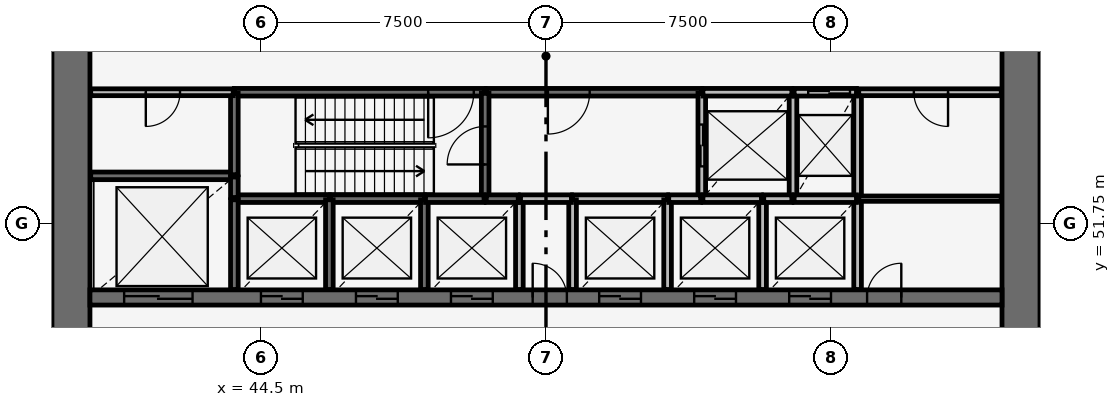
"""IFC4 building model, lengths in metres.
Left out: names, types, materials, properties, quantities, classifications, styles, units other than length and angle.
Written with IfcOpenShell. Run it as: python <this file> out.ifc"""

import sys

from ifc_helpers import new_model, si_unit, direction, frame, frame_2d, origin, place, context, subcontext, project, spatial, rectangle, extrude, source, transform, mapped, element, fill, save


model = new_model("IFC4")
c1 = context("Model", 3, precision=1e-05, world=origin(), true_north=direction((0.0, 1.0)))
c2 = subcontext(c1, "Body", "Model", "MODEL_VIEW")
j1 = project(units=[si_unit("LENGTHUNIT", "METRE"), si_unit("PLANEANGLEUNIT", "RADIAN")], contexts=[c1])
p1 = place(None, origin())
s1 = spatial("IfcSite", under=j1, at=p1, CompositionType="ELEMENT")
p2 = place(p1, origin())
s2 = spatial("IfcBuilding", under=s1, at=p2, CompositionType="ELEMENT")
p3 = place(p2, origin())
s3 = spatial("IfcBuildingStorey", under=s2, at=p3, CompositionType="ELEMENT", Elevation=0.0)
p4 = place(p3, frame((64.5, 38.0, -0.35), z_axis=(0.0, 0.0, 1.0), x_axis=(0.0, 1.0, 0.0)))
e1 = element("IfcWall", 1, at=p4, inside=s3, PredefinedType="SHEAR", context=c2, shape_type="SweptSolid", body=[
    extrude(rectangle(XDim=20.0, YDim=1.0, at=frame_2d((10.0, 0.0))), origin(), (0.0, 0.0, 1.0), 5.35),
])
p5 = place(p4, frame((9.1, 0.0, 0.35)))
e2 = element("IfcOpeningElement", 2, at=p5, cuts=e1, PredefinedType="OPENING", context=c2, shape_type="SweptSolid", body=[
    extrude(rectangle(XDim=1.8, YDim=2.1, at=frame_2d((0.9, 1.05))), frame((0.0, 0.51, 0.0), z_axis=(0.0, -1.0, 0.0), x_axis=(1.0, 0.0, 0.0)), (0.0, 0.0, 1.0), 1.02),
])
p6 = place(p3, frame((39.5, 58.0, -0.35), z_axis=(0.0, 0.0, 1.0), x_axis=(0.0, -1.0, 0.0)))
e3 = element("IfcWall", 3, at=p6, inside=s3, PredefinedType="SHEAR", context=c2, shape_type="SweptSolid", body=[
    extrude(rectangle(XDim=20.0, YDim=1.0, at=frame_2d((10.0, 0.0))), origin(), (0.0, 0.0, 1.0), 5.35),
])
p7 = place(p6, frame((9.1, 0.0, 0.35)))
e4 = element("IfcOpeningElement", 4, at=p7, cuts=e3, PredefinedType="OPENING", context=c2, shape_type="SweptSolid", body=[
    extrude(rectangle(XDim=1.8, YDim=2.1, at=frame_2d((0.9, 1.05))), frame((0.0, 0.51, 0.0), z_axis=(0.0, -1.0, 0.0), x_axis=(1.0, 0.0, 0.0)), (0.0, 0.0, 1.0), 1.02),
])
p8 = place(p3, frame((40.0, 49.8, -0.35), z_axis=(0.0, 0.0, 1.0), x_axis=(1.0, 0.0, 0.0)))
e5 = element("IfcWall", 5, at=p8, inside=s3, PredefinedType="SHEAR", context=c2, shape_type="SweptSolid", body=[
    extrude(rectangle(XDim=24.0, YDim=0.4, at=frame_2d((12.0, 0.0))), origin(), (0.0, 0.0, 1.0), 5.35),
])
p9 = place(p8, frame((13.4, 0.0, 0.35)))
e6 = element("IfcOpeningElement", 6, at=p9, cuts=e5, PredefinedType="OPENING", context=c2, shape_type="SweptSolid", body=[
    extrude(rectangle(XDim=1.1, YDim=2.1, at=frame_2d((0.55, 1.05))), frame((0.0, 0.21, 0.0), z_axis=(0.0, -1.0, 0.0), x_axis=(1.0, 0.0, 0.0)), (0.0, 0.0, 1.0), 0.42),
])
p10 = place(p8, frame((15.9, 0.0, 0.35)))
e7 = element("IfcOpeningElement", 7, at=p10, cuts=e5, PredefinedType="OPENING", context=c2, shape_type="SweptSolid", body=[
    extrude(rectangle(XDim=1.1, YDim=2.1, at=frame_2d((0.55, 1.05))), frame((0.0, 0.21, 0.0), z_axis=(0.0, -1.0, 0.0), x_axis=(1.0, 0.0, 0.0)), (0.0, 0.0, 1.0), 0.42),
])
p11 = place(p8, frame((18.4, 0.0, 0.35)))
e8 = element("IfcOpeningElement", 8, at=p11, cuts=e5, PredefinedType="OPENING", context=c2, shape_type="SweptSolid", body=[
    extrude(rectangle(XDim=1.1, YDim=2.1, at=frame_2d((0.55, 1.05))), frame((0.0, 0.21, 0.0), z_axis=(0.0, -1.0, 0.0), x_axis=(1.0, 0.0, 0.0)), (0.0, 0.0, 1.0), 0.42),
])
p12 = place(p8, frame((4.5, 0.0, 0.35)))
e9 = element("IfcOpeningElement", 9, at=p12, cuts=e5, PredefinedType="OPENING", context=c2, shape_type="SweptSolid", body=[
    extrude(rectangle(XDim=1.1, YDim=2.1, at=frame_2d((0.55, 1.05))), frame((0.0, 0.21, 0.0), z_axis=(0.0, -1.0, 0.0), x_axis=(1.0, 0.0, 0.0)), (0.0, 0.0, 1.0), 0.42),
])
p13 = place(p8, frame((7.0, 0.0, 0.35)))
e10 = element("IfcOpeningElement", 10, at=p13, cuts=e5, PredefinedType="OPENING", context=c2, shape_type="SweptSolid", body=[
    extrude(rectangle(XDim=1.1, YDim=2.1, at=frame_2d((0.55, 1.05))), frame((0.0, 0.21, 0.0), z_axis=(0.0, -1.0, 0.0), x_axis=(1.0, 0.0, 0.0)), (0.0, 0.0, 1.0), 0.42),
])
p14 = place(p8, frame((9.5, 0.0, 0.35)))
e11 = element("IfcOpeningElement", 11, at=p14, cuts=e5, PredefinedType="OPENING", context=c2, shape_type="SweptSolid", body=[
    extrude(rectangle(XDim=1.1, YDim=2.1, at=frame_2d((0.55, 1.05))), frame((0.0, 0.21, 0.0), z_axis=(0.0, -1.0, 0.0), x_axis=(1.0, 0.0, 0.0)), (0.0, 0.0, 1.0), 0.42),
])
p15 = place(p8, frame((0.9, 0.0, 0.35)))
e12 = element("IfcOpeningElement", 12, at=p15, cuts=e5, PredefinedType="OPENING", context=c2, shape_type="SweptSolid", body=[
    extrude(rectangle(XDim=1.8, YDim=2.4, at=frame_2d((0.9, 1.2))), frame((0.0, 0.21, 0.0), z_axis=(0.0, -1.0, 0.0), x_axis=(1.0, 0.0, 0.0)), (0.0, 0.0, 1.0), 0.42),
])
p16 = place(p8, frame((20.45, 0.0, 0.35)))
e13 = element("IfcOpeningElement", 13, at=p16, cuts=e5, PredefinedType="OPENING", context=c2, shape_type="SweptSolid", body=[
    extrude(rectangle(XDim=0.9, YDim=2.1, at=frame_2d((0.45, 1.05))), frame((0.0, 0.21, 0.0), z_axis=(0.0, -1.0, 0.0), x_axis=(1.0, 0.0, 0.0)), (0.0, 0.0, 1.0), 0.42),
])
p17 = place(p8, frame((11.65, 0.0, 0.35)))
e14 = element("IfcOpeningElement", 14, at=p17, cuts=e5, PredefinedType="OPENING", context=c2, shape_type="SweptSolid", body=[
    extrude(rectangle(XDim=0.9, YDim=2.1, at=frame_2d((0.45, 1.05))), frame((0.0, 0.21, 0.0), z_axis=(0.0, -1.0, 0.0), x_axis=(1.0, 0.0, 0.0)), (0.0, 0.0, 1.0), 0.42),
])
p18 = place(p3, frame((50.4, 55.2, 0.0), z_axis=(0.0, 0.0, 1.0), x_axis=(-1.0, 0.0, 0.0)))
e15 = element("IfcWall", 15, at=p18, inside=s3, PredefinedType="SOLIDWALL", context=c2, shape_type="SweptSolid", body=[
    extrude(rectangle(XDim=6.6, YDim=0.2, at=frame_2d((3.3, 0.0))), origin(), (0.0, 0.0, 1.0), 4.65),
])
p19 = place(p18, frame((0.3, 0.0, 0.0)))
e16 = element("IfcOpeningElement", 16, at=p19, cuts=e15, PredefinedType="OPENING", context=c2, shape_type="SweptSolid", body=[
    extrude(rectangle(XDim=1.2, YDim=2.1, at=frame_2d((0.6, 1.05))), frame((0.0, 0.11, 0.0), z_axis=(0.0, -1.0, 0.0), x_axis=(1.0, 0.0, 0.0)), (0.0, 0.0, 1.0), 0.22),
])
p20 = place(p3, frame((56.1, 55.2, 0.0), z_axis=(0.0, 0.0, 1.0), x_axis=(-1.0, 0.0, 0.0)))
e17 = element("IfcWall", 17, at=p20, inside=s3, PredefinedType="SOLIDWALL", context=c2, shape_type="SweptSolid", body=[
    extrude(rectangle(XDim=5.67, YDim=0.2, at=frame_2d((2.835, 0.0))), origin(), (0.0, 0.0, 1.0), 4.65),
])
p21 = place(p20, frame((2.95, 0.0, 0.0)))
e18 = element("IfcOpeningElement", 18, at=p21, cuts=e17, PredefinedType="OPENING", context=c2, shape_type="SweptSolid", body=[
    extrude(rectangle(XDim=1.1, YDim=2.1, at=frame_2d((0.55, 1.05))), frame((0.0, 0.11, 0.0), z_axis=(0.0, -1.0, 0.0), x_axis=(1.0, 0.0, 0.0)), (0.0, 0.0, 1.0), 0.22),
])
p22 = place(p3, frame((43.8, 53.0, 0.0), z_axis=(0.0, 0.0, 1.0), x_axis=(-1.0, 0.0, 0.0)))
e19 = element("IfcWall", 19, at=p22, inside=s3, PredefinedType="SOLIDWALL", context=c2, shape_type="SweptSolid", body=[
    extrude(rectangle(XDim=3.78, YDim=0.2, at=frame_2d((1.89, 0.0))), origin(), (0.0, 0.0, 1.0), 4.65),
])
p23 = place(p3, frame((50.4, 52.4, 0.0), z_axis=(0.0, 0.0, 1.0), x_axis=(0.0, 1.0, 0.0)))
e20 = element("IfcWall", 20, at=p23, inside=s3, PredefinedType="SOLIDWALL", context=c2, shape_type="SweptSolid", body=[
    extrude(rectangle(XDim=2.77, YDim=0.2, at=frame_2d((1.385, 0.0))), origin(), (0.0, 0.0, 1.0), 4.65),
])
p24 = place(p23, frame((0.9, 0.0, 0.0)))
e21 = element("IfcOpeningElement", 21, at=p24, cuts=e20, PredefinedType="OPENING", context=c2, shape_type="SweptSolid", body=[
    extrude(rectangle(XDim=1.0, YDim=2.1, at=frame_2d((0.5, 1.05))), frame((0.0, 0.11, 0.0), z_axis=(0.0, -1.0, 0.0), x_axis=(1.0, 0.0, 0.0)), (0.0, 0.0, 1.0), 0.22),
])
p25 = place(p3, frame((56.1, 55.17, 0.0), z_axis=(0.0, 0.0, 1.0), x_axis=(0.0, -1.0, 0.0)))
e22 = element("IfcWall", 22, at=p25, inside=s3, PredefinedType="SOLIDWALL", context=c2, shape_type="SweptSolid", body=[
    extrude(rectangle(XDim=2.77, YDim=0.2, at=frame_2d((1.385, 0.0))), origin(), (0.0, 0.0, 1.0), 4.65),
])
p26 = place(p25, frame((0.82, 0.0, 0.0)))
e23 = element("IfcOpeningElement", 23, at=p26, cuts=e22, PredefinedType="OPENING", context=c2, shape_type="SweptSolid", body=[
    extrude(rectangle(XDim=1.1, YDim=2.1, at=frame_2d((0.55, 1.05))), frame((0.0, 0.11, 0.0), z_axis=(0.0, -1.0, 0.0), x_axis=(1.0, 0.0, 0.0)), (0.0, 0.0, 1.0), 0.22),
])
for number, where, z_axis, x_axis in (
    (24, (58.5, 52.4, 0.0), (0.0, 0.0, 1.0), (0.0, 1.0, 0.0)),
    (25, (60.2, 52.4, 0.0), (0.0, 0.0, 1.0), (0.0, 1.0, 0.0)),
):
    element("IfcWall", number, at=place(p3, frame(where, z_axis=z_axis, x_axis=x_axis)), inside=s3, PredefinedType="SOLIDWALL", context=c2, shape_type="SweptSolid", body=[
        extrude(rectangle(XDim=2.8, YDim=0.2, at=frame_2d((1.4, 0.0))), origin(), (0.0, 0.0, 1.0), 4.65),
    ])
p27 = place(p3, frame((46.3, 52.4, 0.0), z_axis=(0.0, 0.0, 1.0), x_axis=(-1.0, 0.0, 0.0)))
e26 = element("IfcWall", 26, at=p27, inside=s3, PredefinedType="SOLIDWALL", context=c2, shape_type="SweptSolid", body=[
    extrude(rectangle(XDim=2.5, YDim=0.2, at=frame_2d((1.25, 0.0))), origin(), (0.0, 0.0, 1.0), 4.65),
])
p28 = place(p3, frame((48.8, 52.4, 0.0), z_axis=(0.0, 0.0, 1.0), x_axis=(-1.0, 0.0, 0.0)))
e27 = element("IfcWall", 27, at=p28, inside=s3, PredefinedType="SOLIDWALL", context=c2, shape_type="SweptSolid", body=[
    extrude(rectangle(XDim=2.47, YDim=0.2, at=frame_2d((1.235, 0.0))), origin(), (0.0, 0.0, 1.0), 4.65),
])
p29 = place(p3, frame((55.2, 52.4, 0.0), z_axis=(0.0, 0.0, 1.0), x_axis=(-1.0, 0.0, 0.0)))
e28 = element("IfcWall", 28, at=p29, inside=s3, PredefinedType="SOLIDWALL", context=c2, shape_type="SweptSolid", body=[
    extrude(rectangle(XDim=2.5, YDim=0.2, at=frame_2d((1.25, 0.0))), origin(), (0.0, 0.0, 1.0), 4.65),
])
p30 = place(p3, frame((58.47, 55.2, 0.0), z_axis=(0.0, 0.0, 1.0), x_axis=(-1.0, 0.0, 0.0)))
e29 = element("IfcWall", 29, at=p30, inside=s3, PredefinedType="SOLIDWALL", context=c2, shape_type="SweptSolid", body=[
    extrude(rectangle(XDim=2.34, YDim=0.2, at=frame_2d((1.17, 0.0))), origin(), (0.0, 0.0, 1.0), 4.65),
])
for number, where, z_axis, x_axis in (
    (30, (43.8, 52.37, 0.0), (0.0, 0.0, 1.0), (0.0, -1.0, 0.0)),
    (31, (46.3, 50.01, 0.0), (0.0, 0.0, 1.0), (0.0, 1.0, 0.0)),
    (32, (48.8, 50.01, 0.0), (0.0, 0.0, 1.0), (0.0, 1.0, 0.0)),
):
    element("IfcWall", number, at=place(p3, frame(where, z_axis=z_axis, x_axis=x_axis)), inside=s3, PredefinedType="SOLIDWALL", context=c2, shape_type="SweptSolid", body=[
        extrude(rectangle(XDim=2.36, YDim=0.2, at=frame_2d((1.18, 0.0))), origin(), (0.0, 0.0, 1.0), 4.65),
    ])
p31 = place(p3, frame((51.3, 50.01, 0.0), z_axis=(0.0, 0.0, 1.0), x_axis=(0.0, 1.0, 0.0)))
e33 = element("IfcWall", 33, at=p31, inside=s3, PredefinedType="SOLIDWALL", context=c2, shape_type="SweptSolid", body=[
    extrude(rectangle(XDim=2.39, YDim=0.2, at=frame_2d((1.195, 0.0))), origin(), (0.0, 0.0, 1.0), 4.65),
])
for number, where, z_axis, x_axis in (
    (34, (52.7, 52.37, 0.0), (0.0, 0.0, 1.0), (0.0, -1.0, 0.0)),
    (35, (55.2, 50.01, 0.0), (0.0, 0.0, 1.0), (0.0, 1.0, 0.0)),
):
    element("IfcWall", number, at=place(p3, frame(where, z_axis=z_axis, x_axis=x_axis)), inside=s3, PredefinedType="SOLIDWALL", context=c2, shape_type="SweptSolid", body=[
        extrude(rectangle(XDim=2.36, YDim=0.2, at=frame_2d((1.18, 0.0))), origin(), (0.0, 0.0, 1.0), 4.65),
    ])
p32 = place(p3, frame((57.7, 50.01, 0.0), z_axis=(0.0, 0.0, 1.0), x_axis=(0.0, 1.0, 0.0)))
e36 = element("IfcWall", 36, at=p32, inside=s3, PredefinedType="SOLIDWALL", context=c2, shape_type="SweptSolid", body=[
    extrude(rectangle(XDim=2.39, YDim=0.2, at=frame_2d((1.195, 0.0))), origin(), (0.0, 0.0, 1.0), 4.65),
])
p33 = place(p3, frame((60.2, 50.01, 0.0), z_axis=(0.0, 0.0, 1.0), x_axis=(0.0, 1.0, 0.0)))
e37 = element("IfcWall", 37, at=p33, inside=s3, PredefinedType="SOLIDWALL", context=c2, shape_type="SweptSolid", body=[
    extrude(rectangle(XDim=2.36, YDim=0.2, at=frame_2d((1.18, 0.0))), origin(), (0.0, 0.0, 1.0), 4.65),
])
p34 = place(p3, frame((43.8, 55.17, 0.0), z_axis=(0.0, 0.0, 1.0), x_axis=(0.0, -1.0, 0.0)))
e38 = element("IfcWall", 38, at=p34, inside=s3, PredefinedType="SOLIDWALL", context=c2, shape_type="SweptSolid", body=[
    extrude(rectangle(XDim=2.14, YDim=0.2, at=frame_2d((1.07, 0.0))), origin(), (0.0, 0.0, 1.0), 4.65),
])
p35 = place(p3, frame((60.17, 52.4, 0.0), z_axis=(0.0, 0.0, 1.0), x_axis=(-1.0, 0.0, 0.0)))
e39 = element("IfcWall", 39, at=p35, inside=s3, PredefinedType="SOLIDWALL", context=c2, shape_type="SweptSolid", body=[
    extrude(rectangle(XDim=1.64, YDim=0.2, at=frame_2d((0.82, 0.0))), origin(), (0.0, 0.0, 1.0), 4.65),
])
p36 = place(p3, frame((60.17, 55.2, 0.0), z_axis=(0.0, 0.0, 1.0), x_axis=(-1.0, 0.0, 0.0)))
e40 = element("IfcWall", 40, at=p36, inside=s3, PredefinedType="SOLIDWALL", context=c2, shape_type="SweptSolid", body=[
    extrude(rectangle(XDim=1.64, YDim=0.2, at=frame_2d((0.82, 0.0))), origin(), (0.0, 0.0, 1.0), 4.65),
])
p37 = place(p36, frame((0.17, 0.0, 0.0)))
e41 = element("IfcOpeningElement", 41, at=p37, cuts=e40, PredefinedType="OPENING", context=c2, shape_type="SweptSolid", body=[
    extrude(rectangle(XDim=1.1, YDim=2.1, at=frame_2d((0.55, 1.05))), frame((0.0, 0.11, 0.0), z_axis=(0.0, -1.0, 0.0), x_axis=(1.0, 0.0, 0.0)), (0.0, 0.0, 1.0), 0.22),
])
for number, where, z_axis, x_axis in (
    (42, (50.37, 52.4, 0.0), (0.0, 0.0, 1.0), (-1.0, 0.0, 0.0)),
    (43, (57.67, 52.4, 0.0), (0.0, 0.0, 1.0), (-1.0, 0.0, 0.0)),
):
    element("IfcWall", number, at=place(p3, frame(where, z_axis=z_axis, x_axis=x_axis)), inside=s3, PredefinedType="SOLIDWALL", context=c2, shape_type="SweptSolid", body=[
        extrude(rectangle(XDim=1.54, YDim=0.2, at=frame_2d((0.77, 0.0))), origin(), (0.0, 0.0, 1.0), 4.65),
    ])
p38 = place(p3, frame((51.33, 52.4, 0.0), z_axis=(0.0, 0.0, 1.0), x_axis=(1.0, 0.0, 0.0)))
e44 = element("IfcWall", 44, at=p38, inside=s3, PredefinedType="SOLIDWALL", context=c2, shape_type="SweptSolid", body=[
    extrude(rectangle(XDim=1.34, YDim=0.2, at=frame_2d((0.67, 0.0))), origin(), (0.0, 0.0, 1.0), 4.65),
])
for number, where, z_axis, x_axis in (
    (45, (51.27, 52.4, 0.0), (0.0, 0.0, 1.0), (-1.0, 0.0, 0.0)),
    (46, (56.07, 52.4, 0.0), (0.0, 0.0, 1.0), (-1.0, 0.0, 0.0)),
):
    element("IfcWall", number, at=place(p3, frame(where, z_axis=z_axis, x_axis=x_axis)), inside=s3, PredefinedType="SOLIDWALL", context=c2, shape_type="SweptSolid", body=[
        extrude(rectangle(XDim=0.84, YDim=0.2, at=frame_2d((0.42, 0.0))), origin(), (0.0, 0.0, 1.0), 4.65),
    ])
p39 = place(p3, frame((58.47, 52.4, 0.0), z_axis=(0.0, 0.0, 1.0), x_axis=(-1.0, 0.0, 0.0)))
e47 = element("IfcWall", 47, at=p39, inside=s3, PredefinedType="SOLIDWALL", context=c2, shape_type="SweptSolid", body=[
    extrude(rectangle(XDim=0.74, YDim=0.2, at=frame_2d((0.37, 0.0))), origin(), (0.0, 0.0, 1.0), 4.65),
])
p40 = place(p3, frame((43.8, 52.43, 0.0), z_axis=(0.0, 0.0, 1.0), x_axis=(0.0, 1.0, 0.0)))
e48 = element("IfcWall", 48, at=p40, inside=s3, PredefinedType="SOLIDWALL", context=c2, shape_type="SweptSolid", body=[
    extrude(rectangle(XDim=0.54, YDim=0.2, at=frame_2d((0.27, 0.0))), origin(), (0.0, 0.0, 1.0), 4.65),
])
p41 = place(p3, frame((43.77, 55.2, 0.0), z_axis=(0.0, 0.0, 1.0), x_axis=(-1.0, 0.0, 0.0)))
e49 = element("IfcWall", 49, at=p41, inside=s3, PredefinedType="PARTITIONING", context=c2, shape_type="SweptSolid", body=[
    extrude(rectangle(XDim=3.75, YDim=0.18, at=frame_2d((1.875, 0.0))), origin(), (0.0, 0.0, 1.0), 4.65),
])
p42 = place(p41, frame((1.4, 0.0, 0.0)))
e50 = element("IfcOpeningElement", 50, at=p42, cuts=e49, PredefinedType="OPENING", context=c2, shape_type="SweptSolid", body=[
    extrude(rectangle(XDim=0.9, YDim=2.1, at=frame_2d((0.45, 1.05))), frame((0.0, 0.1, 0.0), z_axis=(0.0, -1.0, 0.0), x_axis=(1.0, 0.0, 0.0)), (0.0, 0.0, 1.0), 0.2),
])
p43 = place(p3, frame((63.98, 55.2, 0.0), z_axis=(0.0, 0.0, 1.0), x_axis=(-1.0, 0.0, 0.0)))
e51 = element("IfcWall", 51, at=p43, inside=s3, PredefinedType="PARTITIONING", context=c2, shape_type="SweptSolid", body=[
    extrude(rectangle(XDim=3.75, YDim=0.18, at=frame_2d((1.875, 0.0))), origin(), (0.0, 0.0, 1.0), 4.65),
])
p44 = place(p43, frame((1.4, 0.0, 0.0)))
e52 = element("IfcOpeningElement", 52, at=p44, cuts=e51, PredefinedType="OPENING", context=c2, shape_type="SweptSolid", body=[
    extrude(rectangle(XDim=0.9, YDim=2.1, at=frame_2d((0.45, 1.05))), frame((0.0, 0.1, 0.0), z_axis=(0.0, -1.0, 0.0), x_axis=(1.0, 0.0, 0.0)), (0.0, 0.0, 1.0), 0.2),
])
p45 = place(p3, frame((63.98, 52.4, 0.0), z_axis=(0.0, 0.0, 1.0), x_axis=(-1.0, 0.0, 0.0)))
e53 = element("IfcWall", 53, at=p45, inside=s3, PredefinedType="PARTITIONING", context=c2, shape_type="SweptSolid", body=[
    extrude(rectangle(XDim=3.75, YDim=0.14, at=frame_2d((1.875, 0.0))), origin(), (0.0, 0.0, 1.0), 3.85),
])
m1 = source(origin(), c2, "Body", "SweptSolid", [
    extrude(rectangle(XDim=1.1, YDim=2.1, at=frame_2d((0.55, 1.05))), frame((0.0, 0.025, 0.0), z_axis=(0.0, -1.0, 0.0), x_axis=(1.0, 0.0, 0.0)), (0.0, 0.0, 1.0), 0.05),
])
p46 = place(p9, origin())
e54 = element("IfcDoor", 54, at=p46, inside=s3, OperationType="DOUBLE_DOOR_SLIDING", PredefinedType="USERDEFINED", context=c2, shape_type="MappedRepresentation", body=[
    mapped(m1, transform((0.0, 0.0, 0.0), scale=1.0)),
])
fill(e6, e54)
p47 = place(p10, origin())
e55 = element("IfcDoor", 55, at=p47, inside=s3, OperationType="DOUBLE_DOOR_SLIDING", PredefinedType="USERDEFINED", context=c2, shape_type="MappedRepresentation", body=[
    mapped(m1, transform((0.0, 0.0, 0.0), scale=1.0)),
])
fill(e7, e55)
p48 = place(p11, origin())
e56 = element("IfcDoor", 56, at=p48, inside=s3, OperationType="DOUBLE_DOOR_SLIDING", PredefinedType="USERDEFINED", context=c2, shape_type="MappedRepresentation", body=[
    mapped(m1, transform((0.0, 0.0, 0.0), scale=1.0)),
])
fill(e8, e56)
p49 = place(p12, origin())
e57 = element("IfcDoor", 57, at=p49, inside=s3, OperationType="DOUBLE_DOOR_SLIDING", PredefinedType="USERDEFINED", context=c2, shape_type="MappedRepresentation", body=[
    mapped(m1, transform((0.0, 0.0, 0.0), scale=1.0)),
])
fill(e9, e57)
p50 = place(p13, origin())
e58 = element("IfcDoor", 58, at=p50, inside=s3, OperationType="DOUBLE_DOOR_SLIDING", PredefinedType="USERDEFINED", context=c2, shape_type="MappedRepresentation", body=[
    mapped(m1, transform((0.0, 0.0, 0.0), scale=1.0)),
])
fill(e10, e58)
p51 = place(p14, origin())
e59 = element("IfcDoor", 59, at=p51, inside=s3, OperationType="DOUBLE_DOOR_SLIDING", PredefinedType="USERDEFINED", context=c2, shape_type="MappedRepresentation", body=[
    mapped(m1, transform((0.0, 0.0, 0.0), scale=1.0)),
])
fill(e11, e59)
p52 = place(p26, origin())
e60 = element("IfcDoor", 60, at=p52, inside=s3, OperationType="DOUBLE_DOOR_SLIDING", PredefinedType="USERDEFINED", context=c2, shape_type="MappedRepresentation", body=[
    mapped(m1, transform((0.0, 0.0, 0.0), scale=1.0)),
])
fill(e23, e60)
p53 = place(p37, origin())
e61 = element("IfcDoor", 61, at=p53, inside=s3, OperationType="DOUBLE_DOOR_SLIDING", PredefinedType="USERDEFINED", context=c2, shape_type="MappedRepresentation", body=[
    mapped(m1, transform((0.0, 0.0, 0.0), scale=1.0)),
])
fill(e41, e61)
m2 = source(origin(), c2, "Body", "SweptSolid", [
    extrude(rectangle(XDim=1.8, YDim=2.4, at=frame_2d((0.9, 1.2))), frame((0.0, 0.025, 0.0), z_axis=(0.0, -1.0, 0.0), x_axis=(1.0, 0.0, 0.0)), (0.0, 0.0, 1.0), 0.05),
])
p54 = place(p15, origin())
e62 = element("IfcDoor", 62, at=p54, inside=s3, OperationType="DOUBLE_DOOR_SLIDING", PredefinedType="USERDEFINED", context=c2, shape_type="MappedRepresentation", body=[
    mapped(m2, transform((0.0, 0.0, 0.0), scale=1.0)),
])
fill(e12, e62)
m3 = source(origin(), c2, "Body", "SweptSolid", [
    extrude(rectangle(XDim=1.2, YDim=2.1, at=frame_2d((0.6, 1.05))), frame((0.0, 0.025, 0.0), z_axis=(0.0, -1.0, 0.0), x_axis=(1.0, 0.0, 0.0)), (0.0, 0.0, 1.0), 0.05),
])
p55 = place(p19, origin())
e63 = element("IfcDoor", 63, at=p55, inside=s3, OperationType="SINGLE_SWING_RIGHT", PredefinedType="DOOR", context=c2, shape_type="MappedRepresentation", body=[
    mapped(m3, transform((0.0, 0.0, 0.0), scale=1.0)),
])
fill(e16, e63)
m4 = source(origin(), c2, "Body", "SweptSolid", [
    extrude(rectangle(XDim=1.0, YDim=2.1, at=frame_2d((0.5, 1.05))), frame((0.0, 0.025, 0.0), z_axis=(0.0, -1.0, 0.0), x_axis=(1.0, 0.0, 0.0)), (0.0, 0.0, 1.0), 0.05),
])
p56 = place(p24, origin())
e64 = element("IfcDoor", 64, at=p56, inside=s3, OperationType="SINGLE_SWING_LEFT", PredefinedType="DOOR", context=c2, shape_type="MappedRepresentation", body=[
    mapped(m4, transform((0.0, 0.0, 0.0), scale=1.0)),
])
fill(e21, e64)
m5 = source(origin(), c2, "Body", "SweptSolid", [
    extrude(rectangle(XDim=1.1, YDim=2.1, at=frame_2d((0.55, 1.05))), frame((0.0, 0.025, 0.0), z_axis=(0.0, -1.0, 0.0), x_axis=(1.0, 0.0, 0.0)), (0.0, 0.0, 1.0), 0.05),
])
p57 = place(p21, origin())
e65 = element("IfcDoor", 65, at=p57, inside=s3, OperationType="SINGLE_SWING_RIGHT", PredefinedType="DOOR", context=c2, shape_type="MappedRepresentation", body=[
    mapped(m5, transform((0.0, 0.0, 0.0), scale=1.0)),
])
fill(e18, e65)
m6 = source(origin(), c2, "Body", "SweptSolid", [
    extrude(rectangle(XDim=0.9, YDim=2.1, at=frame_2d((0.45, 1.05))), frame((0.0, 0.025, 0.0), z_axis=(0.0, -1.0, 0.0), x_axis=(1.0, 0.0, 0.0)), (0.0, 0.0, 1.0), 0.05),
])
p58 = place(p42, origin())
e66 = element("IfcDoor", 66, at=p58, inside=s3, OperationType="SINGLE_SWING_RIGHT", PredefinedType="DOOR", context=c2, shape_type="MappedRepresentation", body=[
    mapped(m6, transform((0.0, 0.0, 0.0), scale=1.0)),
])
fill(e50, e66)
p59 = place(p16, origin())
e67 = element("IfcDoor", 67, at=p59, inside=s3, OperationType="SINGLE_SWING_RIGHT", PredefinedType="DOOR", context=c2, shape_type="MappedRepresentation", body=[
    mapped(m6, transform((0.0, 0.0, 0.0), scale=1.0)),
])
fill(e13, e67)
p60 = place(p44, origin())
e68 = element("IfcDoor", 68, at=p60, inside=s3, OperationType="SINGLE_SWING_LEFT", PredefinedType="DOOR", context=c2, shape_type="MappedRepresentation", body=[
    mapped(m6, transform((0.0, 0.0, 0.0), scale=1.0)),
])
fill(e52, e68)
p61 = place(p17, origin())
e69 = element("IfcDoor", 69, at=p61, inside=s3, OperationType="SINGLE_SWING_LEFT", PredefinedType="DOOR", context=c2, shape_type="MappedRepresentation", body=[
    mapped(m6, transform((0.0, 0.0, 0.0), scale=1.0)),
])
fill(e14, e69)
save(model, sys.argv[1])
